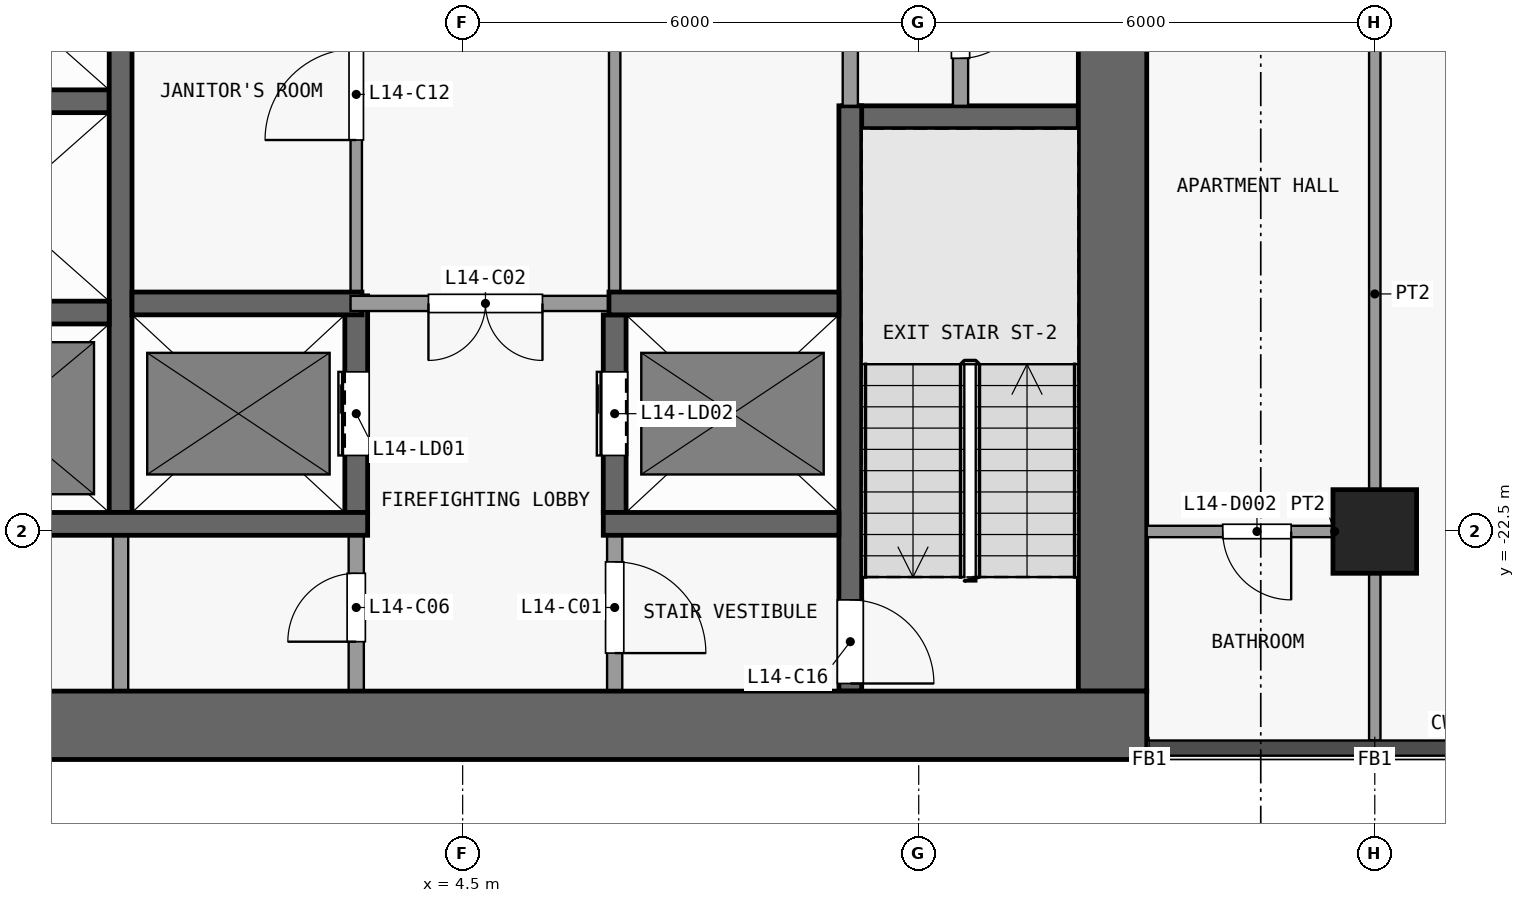
"""IFC4 building model, lengths in metres.
Left out: names, types, materials, properties, quantities, classifications, styles, units other than length and angle.
Written with IfcOpenShell. Run it as: python <this file> out.ifc"""

import sys

from ifc_helpers import new_model, si_unit, direction, frame, frame_2d, origin, origin_2d, place, context, subcontext, project, spatial, rectangle, extrude, element, fill, save


model = new_model("IFC4")
c1 = context("Model", 3, precision=1e-05, world=origin(), true_north=direction((0.0, 1.0)))
c2 = subcontext(c1, "Body", "Model", "MODEL_VIEW")
j1 = project(units=[si_unit("LENGTHUNIT", "METRE"), si_unit("PLANEANGLEUNIT", "RADIAN")], contexts=[c1])
p1 = place(None, origin())
s1 = spatial("IfcSite", under=j1, at=p1, CompositionType="ELEMENT")
p2 = place(p1, origin())
s2 = spatial("IfcBuilding", under=s1, at=p2, CompositionType="ELEMENT")
p3 = place(p2, frame((0.0, 0.0, 61.3)))
s3 = spatial("IfcBuildingStorey", under=s2, at=p3, CompositionType="ELEMENT", Elevation=61.3)
p4 = place(p3, frame((16.5, -22.5, 0.0), z_axis=(0.0, 0.0, 1.0), x_axis=(1.0, 0.0, 0.0)))
e1 = element("IfcColumn", 1, at=p4, inside=s3, PredefinedType="COLUMN", context=c2, shape_type="SweptSolid", body=[
    extrude(rectangle(XDim=1.1, YDim=1.1, at=origin_2d()), origin(), (0.0, 0.0, 1.0), 3.6),
])
p5 = place(p3, frame((-13.5, -25.05, 0.0), z_axis=(0.0, 0.0, 1.0), x_axis=(1.0, 0.0, 0.0)))
e2 = element("IfcWall", 2, at=p5, inside=s3, PredefinedType="SHEAR", context=c2, shape_type="SweptSolid", body=[
    extrude(rectangle(XDim=27.0, YDim=0.9, at=frame_2d((13.5, 0.0))), origin(), (0.0, 0.0, 1.0), 3.3),
])
p6 = place(p3, frame((13.05, -24.6, 0.0), z_axis=(0.0, 0.0, 1.0), x_axis=(0.0, 1.0, 0.0)))
e3 = element("IfcWall", 3, at=p6, inside=s3, PredefinedType="SHEAR", context=c2, shape_type="SweptSolid", body=[
    extrude(rectangle(XDim=16.1, YDim=0.9, at=frame_2d((8.05, 0.0))), origin(), (0.0, 0.0, 1.0), 3.3),
])
p7 = place(p3, frame((-2.95, -22.4, 0.0), z_axis=(0.0, 0.0, 1.0), x_axis=(1.0, 0.0, 0.0)))
e4 = element("IfcWall", 4, at=p7, inside=s3, PredefinedType="SHEAR", context=c2, shape_type="SweptSolid", body=[
    extrude(rectangle(XDim=6.2, YDim=0.3, at=frame_2d((3.1, 0.0))), origin(), (0.0, 0.0, 1.0), 3.3),
])
p8 = place(p3, frame((6.35, -22.4, 0.0), z_axis=(0.0, 0.0, 1.0), x_axis=(1.0, 0.0, 0.0)))
e5 = element("IfcWall", 5, at=p8, inside=s3, PredefinedType="SHEAR", context=c2, shape_type="SweptSolid", body=[
    extrude(rectangle(XDim=3.1, YDim=0.3, at=frame_2d((1.55, 0.0))), origin(), (0.0, 0.0, 1.0), 3.3),
])
p9 = place(p3, frame((-2.95, -19.62, 0.0), z_axis=(0.0, 0.0, 1.0), x_axis=(1.0, 0.0, 0.0)))
e6 = element("IfcWall", 6, at=p9, inside=s3, PredefinedType="SHEAR", context=c2, shape_type="SweptSolid", body=[
    extrude(rectangle(XDim=2.8, YDim=0.3, at=frame_2d((1.4, 0.0))), origin(), (0.0, 0.0, 1.0), 3.3),
])
p10 = place(p3, frame((0.15, -19.5, 0.0), z_axis=(0.0, 0.0, 1.0), x_axis=(1.0, 0.0, 0.0)))
e7 = element("IfcWall", 7, at=p10, inside=s3, PredefinedType="SHEAR", context=c2, shape_type="SweptSolid", body=[
    extrude(rectangle(XDim=3.025, YDim=0.3, at=frame_2d((1.513, 0.0))), origin(), (0.0, 0.0, 1.0), 3.3),
])
p11 = place(p3, frame((6.575, -19.5, 0.0), z_axis=(0.0, 0.0, 1.0), x_axis=(-1.0, 0.0, 0.0)))
e8 = element("IfcWall", 8, at=p11, inside=s3, PredefinedType="PARTITIONING", context=c2, shape_type="SweptSolid", body=[
    extrude(rectangle(XDim=3.55, YDim=0.2, at=frame_2d((1.775, 0.0))), origin(), (0.0, 0.0, 1.0), 3.3),
])
p12 = place(p11, frame((1.025, 0.0, 0.0)))
e9 = element("IfcOpeningElement", 9, at=p12, cuts=e8, PredefinedType="OPENING", context=c2, shape_type="SweptSolid", body=[
    extrude(rectangle(XDim=1.5, YDim=2.1, at=frame_2d((0.75, 1.05))), frame((0.0, 0.11, 0.0), z_axis=(0.0, -1.0, 0.0), x_axis=(1.0, 0.0, 0.0)), (0.0, 0.0, 1.0), 0.22),
])
p13 = place(p3, frame((6.425, -19.5, 0.0), z_axis=(0.0, 0.0, 1.0), x_axis=(1.0, 0.0, 0.0)))
e10 = element("IfcWall", 10, at=p13, inside=s3, PredefinedType="SHEAR", context=c2, shape_type="SweptSolid", body=[
    extrude(rectangle(XDim=3.025, YDim=0.3, at=frame_2d((1.512, 0.0))), origin(), (0.0, 0.0, 1.0), 3.3),
])
p14 = place(p3, frame((9.5, -17.05, 0.0), z_axis=(0.0, 0.0, 1.0), x_axis=(1.0, 0.0, 0.0)))
e11 = element("IfcWall", 11, at=p14, inside=s3, PredefinedType="SHEAR", context=c2, shape_type="SweptSolid", body=[
    extrude(rectangle(XDim=3.1, YDim=0.3, at=frame_2d((1.55, 0.0))), origin(), (0.0, 0.0, 1.0), 3.3),
])
p15 = place(p3, frame((-2.95, -16.84, 0.0), z_axis=(0.0, 0.0, 1.0), x_axis=(1.0, 0.0, 0.0)))
e12 = element("IfcWall", 12, at=p15, inside=s3, PredefinedType="SHEAR", context=c2, shape_type="SweptSolid", body=[
    extrude(rectangle(XDim=2.8, YDim=0.3, at=frame_2d((1.4, 0.0))), origin(), (0.0, 0.0, 1.0), 3.3),
])
p16 = place(p3, frame((0.0, -24.6, 0.0), z_axis=(0.0, 0.0, 1.0), x_axis=(0.0, 1.0, 0.0)))
e13 = element("IfcWall", 13, at=p16, inside=s3, PredefinedType="PARTITIONING", context=c2, shape_type="SweptSolid", body=[
    extrude(rectangle(XDim=2.05, YDim=0.2, at=frame_2d((1.025, 0.0))), origin(), (0.0, 0.0, 1.0), 3.3),
])
p17 = place(p3, frame((0.0, -22.25, 0.0), z_axis=(0.0, 0.0, 1.0), x_axis=(0.0, 1.0, 0.0)))
e14 = element("IfcWall", 14, at=p17, inside=s3, PredefinedType="SHEAR", context=c2, shape_type="SweptSolid", body=[
    extrude(rectangle(XDim=13.75, YDim=0.3, at=frame_2d((6.875, 0.0))), origin(), (0.0, 0.0, 1.0), 3.3),
])
p18 = place(p3, frame((3.1, -24.6, 0.0), z_axis=(0.0, 0.0, 1.0), x_axis=(0.0, 1.0, 0.0)))
e15 = element("IfcWall", 15, at=p18, inside=s3, PredefinedType="PARTITIONING", context=c2, shape_type="SweptSolid", body=[
    extrude(rectangle(XDim=2.05, YDim=0.2, at=frame_2d((1.025, 0.0))), origin(), (0.0, 0.0, 1.0), 3.3),
])
p19 = place(p18, frame((0.65, 0.0, 0.0)))
e16 = element("IfcOpeningElement", 16, at=p19, cuts=e15, PredefinedType="OPENING", context=c2, shape_type="SweptSolid", body=[
    extrude(rectangle(XDim=0.9, YDim=2.1, at=frame_2d((0.45, 1.05))), frame((0.0, 0.11, 0.0), z_axis=(0.0, -1.0, 0.0), x_axis=(1.0, 0.0, 0.0)), (0.0, 0.0, 1.0), 0.22),
])
p20 = place(p3, frame((3.1, -22.25, 0.0), z_axis=(0.0, 0.0, 1.0), x_axis=(0.0, 1.0, 0.0)))
e17 = element("IfcWall", 17, at=p20, inside=s3, PredefinedType="SHEAR", context=c2, shape_type="SweptSolid", body=[
    extrude(rectangle(XDim=2.85, YDim=0.3, at=frame_2d((1.425, 0.0))), origin(), (0.0, 0.0, 1.0), 3.3),
])
p21 = place(p20, frame((0.75, 0.0, 0.0)))
e18 = element("IfcOpeningElement", 18, at=p21, cuts=e17, PredefinedType="OPENING", context=c2, shape_type="SweptSolid", body=[
    extrude(rectangle(XDim=1.1, YDim=2.1, at=frame_2d((0.55, 1.05))), frame((0.0, 0.16, 0.0), z_axis=(0.0, -1.0, 0.0), x_axis=(1.0, 0.0, 0.0)), (0.0, 0.0, 1.0), 0.32),
])
p22 = place(p3, frame((3.1, -19.4, 0.0), z_axis=(0.0, 0.0, 1.0), x_axis=(0.0, 1.0, 0.0)))
e19 = element("IfcWall", 19, at=p22, inside=s3, PredefinedType="PARTITIONING", context=c2, shape_type="SweptSolid", body=[
    extrude(rectangle(XDim=10.9, YDim=0.15, at=frame_2d((5.45, 0.0))), origin(), (0.0, 0.0, 1.0), 3.3),
])
p23 = place(p22, frame((2.05, 0.0, 0.0)))
e20 = element("IfcOpeningElement", 20, at=p23, cuts=e19, PredefinedType="OPENING", context=c2, shape_type="SweptSolid", body=[
    extrude(rectangle(XDim=1.2, YDim=2.1, at=frame_2d((0.6, 1.05))), frame((0.0, 0.085, 0.0), z_axis=(0.0, -1.0, 0.0), x_axis=(1.0, 0.0, 0.0)), (0.0, 0.0, 1.0), 0.17),
])
p24 = place(p22, frame((7.55, 0.0, 0.0)))
e21 = element("IfcOpeningElement", 21, at=p24, cuts=e19, PredefinedType="OPENING", context=c2, shape_type="SweptSolid", body=[
    extrude(rectangle(XDim=1.2, YDim=2.1, at=frame_2d((0.6, 1.05))), frame((0.0, 0.085, 0.0), z_axis=(0.0, -1.0, 0.0), x_axis=(1.0, 0.0, 0.0)), (0.0, 0.0, 1.0), 0.17),
])
p25 = place(p3, frame((6.5, -22.55, 0.0), z_axis=(0.0, 0.0, 1.0), x_axis=(0.0, -1.0, 0.0)))
e22 = element("IfcWall", 22, at=p25, inside=s3, PredefinedType="PARTITIONING", context=c2, shape_type="SweptSolid", body=[
    extrude(rectangle(XDim=2.05, YDim=0.2, at=frame_2d((1.025, 0.0))), origin(), (0.0, 0.0, 1.0), 3.3),
])
p26 = place(p25, frame((0.35, 0.0, 0.0)))
e23 = element("IfcOpeningElement", 23, at=p26, cuts=e22, PredefinedType="OPENING", context=c2, shape_type="SweptSolid", body=[
    extrude(rectangle(XDim=1.2, YDim=2.1, at=frame_2d((0.6, 1.05))), frame((0.0, 0.11, 0.0), z_axis=(0.0, -1.0, 0.0), x_axis=(1.0, 0.0, 0.0)), (0.0, 0.0, 1.0), 0.22),
])
p27 = place(p3, frame((6.5, -22.25, 0.0), z_axis=(0.0, 0.0, 1.0), x_axis=(0.0, 1.0, 0.0)))
e24 = element("IfcWall", 24, at=p27, inside=s3, PredefinedType="SHEAR", context=c2, shape_type="SweptSolid", body=[
    extrude(rectangle(XDim=2.6, YDim=0.3, at=frame_2d((1.3, 0.0))), origin(), (0.0, 0.0, 1.0), 3.3),
])
p28 = place(p27, frame((0.75, 0.0, 0.0)))
e25 = element("IfcOpeningElement", 25, at=p28, cuts=e24, PredefinedType="OPENING", context=c2, shape_type="SweptSolid", body=[
    extrude(rectangle(XDim=1.1, YDim=2.1, at=frame_2d((0.55, 1.05))), frame((0.0, 0.16, 0.0), z_axis=(0.0, -1.0, 0.0), x_axis=(1.0, 0.0, 0.0)), (0.0, 0.0, 1.0), 0.32),
])
p29 = place(p3, frame((6.5, -11.35, 0.0), z_axis=(0.0, 0.0, 1.0), x_axis=(0.0, -1.0, 0.0)))
e26 = element("IfcWall", 26, at=p29, inside=s3, PredefinedType="PARTITIONING", context=c2, shape_type="SweptSolid", body=[
    extrude(rectangle(XDim=8.0, YDim=0.15, at=frame_2d((4.0, 0.0))), origin(), (0.0, 0.0, 1.0), 3.3),
])
p30 = place(p29, frame((3.425, 0.0, 0.0)))
e27 = element("IfcOpeningElement", 27, at=p30, cuts=e26, PredefinedType="OPENING", context=c2, shape_type="SweptSolid", body=[
    extrude(rectangle(XDim=1.2, YDim=2.1, at=frame_2d((0.6, 1.05))), frame((0.0, 0.085, 0.0), z_axis=(0.0, -1.0, 0.0), x_axis=(1.0, 0.0, 0.0)), (0.0, 0.0, 1.0), 0.17),
])
p31 = place(p3, frame((9.6, -16.9, 0.0), z_axis=(0.0, 0.0, 1.0), x_axis=(0.0, -1.0, 0.0)))
e28 = element("IfcWall", 28, at=p31, inside=s3, PredefinedType="SHEAR", context=c2, shape_type="SweptSolid", body=[
    extrude(rectangle(XDim=7.7, YDim=0.3, at=frame_2d((3.85, 0.0))), origin(), (0.0, 0.0, 1.0), 3.3),
])
p32 = place(p31, frame((6.5, 0.0, 0.0)))
e29 = element("IfcOpeningElement", 29, at=p32, cuts=e28, PredefinedType="OPENING", context=c2, shape_type="SweptSolid", body=[
    extrude(rectangle(XDim=1.1, YDim=2.1, at=frame_2d((0.55, 1.05))), frame((0.0, 0.16, 0.0), z_axis=(0.0, -1.0, 0.0), x_axis=(1.0, 0.0, 0.0)), (0.0, 0.0, 1.0), 0.32),
])
p33 = place(p3, frame((9.6, -16.9, 0.0), z_axis=(0.0, 0.0, 1.0), x_axis=(0.0, 1.0, 0.0)))
e30 = element("IfcWall", 30, at=p33, inside=s3, PredefinedType="PARTITIONING", context=c2, shape_type="SweptSolid", body=[
    extrude(rectangle(XDim=5.75, YDim=0.2, at=frame_2d((2.875, 0.0))), origin(), (0.0, 0.0, 1.0), 3.3),
])
p34 = place(p3, frame((11.05, -14.5, 0.0), z_axis=(0.0, 0.0, 1.0), x_axis=(0.0, -1.0, 0.0)))
e31 = element("IfcWall", 31, at=p34, inside=s3, PredefinedType="PARTITIONING", context=c2, shape_type="SweptSolid", body=[
    extrude(rectangle(XDim=2.4, YDim=0.2, at=frame_2d((1.2, 0.0))), origin(), (0.0, 0.0, 1.0), 3.3),
])
p35 = place(p34, frame((0.875, 0.0, 0.0)))
e32 = element("IfcOpeningElement", 32, at=p35, cuts=e31, PredefinedType="OPENING", context=c2, shape_type="SweptSolid", body=[
    extrude(rectangle(XDim=0.9, YDim=2.1, at=frame_2d((0.45, 1.05))), frame((0.0, 0.11, 0.0), z_axis=(0.0, -1.0, 0.0), x_axis=(1.0, 0.0, 0.0)), (0.0, 0.0, 1.0), 0.22),
])
p36 = place(p3, frame((13.5, -22.5, 0.0), z_axis=(0.0, 0.0, 1.0), x_axis=(1.0, 0.0, 0.0)))
e33 = element("IfcWall", 33, at=p36, inside=s3, PredefinedType="PARTITIONING", context=c2, shape_type="SweptSolid", body=[
    extrude(rectangle(XDim=2.925, YDim=0.15, at=frame_2d((1.462, 0.0))), origin(), (0.0, 0.0, 1.0), 3.3),
])
p37 = place(p36, frame((1.0, 0.0, 0.0)))
e34 = element("IfcOpeningElement", 34, at=p37, cuts=e33, PredefinedType="OPENING", context=c2, shape_type="SweptSolid", body=[
    extrude(rectangle(XDim=0.9, YDim=2.1, at=frame_2d((0.45, 1.05))), frame((0.0, 0.085, 0.0), z_axis=(0.0, -1.0, 0.0), x_axis=(1.0, 0.0, 0.0)), (0.0, 0.0, 1.0), 0.17),
])
p38 = place(p3, frame((16.5, -25.25, 0.0), z_axis=(0.0, 0.0, 1.0), x_axis=(0.0, 1.0, 0.0)))
e35 = element("IfcWall", 35, at=p38, inside=s3, PredefinedType="PARTITIONING", context=c2, shape_type="SweptSolid", body=[
    extrude(rectangle(XDim=11.75, YDim=0.15, at=frame_2d((5.875, 0.0))), origin(), (0.0, 0.0, 1.0), 3.3),
])
p39 = place(p21, origin())
e36 = element("IfcDoor", 36, at=p39, inside=s3, OperationType="DOUBLE_DOOR_SLIDING", PredefinedType="DOOR", context=c2, shape_type="SweptSolid", body=[
    extrude(rectangle(XDim=1.1, YDim=2.1, at=frame_2d((0.55, 1.05))), frame((0.0, 0.025, 0.0), z_axis=(0.0, -1.0, 0.0), x_axis=(1.0, 0.0, 0.0)), (0.0, 0.0, 1.0), 0.05),
])
fill(e18, e36)
p40 = place(p28, origin())
e37 = element("IfcDoor", 37, at=p40, inside=s3, OperationType="DOUBLE_DOOR_SLIDING", PredefinedType="DOOR", context=c2, shape_type="SweptSolid", body=[
    extrude(rectangle(XDim=1.1, YDim=2.1, at=frame_2d((0.55, 1.05))), frame((0.0, 0.025, 0.0), z_axis=(0.0, -1.0, 0.0), x_axis=(1.0, 0.0, 0.0)), (0.0, 0.0, 1.0), 0.05),
])
fill(e25, e37)
p41 = place(p26, origin())
e38 = element("IfcDoor", 38, at=p41, inside=s3, OperationType="SINGLE_SWING_RIGHT", PredefinedType="DOOR", context=c2, shape_type="SweptSolid", body=[
    extrude(rectangle(XDim=1.2, YDim=2.1, at=frame_2d((0.6, 1.05))), frame((0.0, 0.025, 0.0), z_axis=(0.0, -1.0, 0.0), x_axis=(1.0, 0.0, 0.0)), (0.0, 0.0, 1.0), 0.05),
])
fill(e23, e38)
p42 = place(p12, origin())
e39 = element("IfcDoor", 39, at=p42, inside=s3, OperationType="DOUBLE_DOOR_SINGLE_SWING", PredefinedType="DOOR", context=c2, shape_type="SweptSolid", body=[
    extrude(rectangle(XDim=1.5, YDim=2.1, at=frame_2d((0.75, 1.05))), frame((0.0, 0.025, 0.0), z_axis=(0.0, -1.0, 0.0), x_axis=(1.0, 0.0, 0.0)), (0.0, 0.0, 1.0), 0.05),
])
fill(e9, e39)
p43 = place(p19, origin())
e40 = element("IfcDoor", 40, at=p43, inside=s3, OperationType="SINGLE_SWING_LEFT", PredefinedType="DOOR", context=c2, shape_type="SweptSolid", body=[
    extrude(rectangle(XDim=0.9, YDim=2.1, at=frame_2d((0.45, 1.05))), frame((0.0, 0.025, 0.0), z_axis=(0.0, -1.0, 0.0), x_axis=(1.0, 0.0, 0.0)), (0.0, 0.0, 1.0), 0.05),
])
fill(e16, e40)
p44 = place(p35, origin())
e41 = element("IfcDoor", 41, at=p44, inside=s3, OperationType="SINGLE_SWING_LEFT", PredefinedType="DOOR", context=c2, shape_type="SweptSolid", body=[
    extrude(rectangle(XDim=0.9, YDim=2.1, at=frame_2d((0.45, 1.05))), frame((0.0, 0.025, 0.0), z_axis=(0.0, -1.0, 0.0), x_axis=(1.0, 0.0, 0.0)), (0.0, 0.0, 1.0), 0.05),
])
fill(e32, e41)
p45 = place(p23, origin())
e42 = element("IfcDoor", 42, at=p45, inside=s3, OperationType="SINGLE_SWING_LEFT", PredefinedType="DOOR", context=c2, shape_type="SweptSolid", body=[
    extrude(rectangle(XDim=1.2, YDim=2.1, at=frame_2d((0.6, 1.05))), frame((0.0, 0.025, 0.0), z_axis=(0.0, -1.0, 0.0), x_axis=(1.0, 0.0, 0.0)), (0.0, 0.0, 1.0), 0.05),
])
fill(e20, e42)
p46 = place(p32, origin())
e43 = element("IfcDoor", 43, at=p46, inside=s3, OperationType="SINGLE_SWING_RIGHT", PredefinedType="DOOR", context=c2, shape_type="SweptSolid", body=[
    extrude(rectangle(XDim=1.1, YDim=2.1, at=frame_2d((0.55, 1.05))), frame((0.0, 0.025, 0.0), z_axis=(0.0, -1.0, 0.0), x_axis=(1.0, 0.0, 0.0)), (0.0, 0.0, 1.0), 0.05),
])
fill(e29, e43)
p47 = place(p37, origin())
e44 = element("IfcDoor", 44, at=p47, inside=s3, OperationType="SINGLE_SWING_RIGHT", PredefinedType="DOOR", context=c2, shape_type="SweptSolid", body=[
    extrude(rectangle(XDim=0.9, YDim=2.1, at=frame_2d((0.45, 1.05))), frame((0.0, 0.025, 0.0), z_axis=(0.0, -1.0, 0.0), x_axis=(1.0, 0.0, 0.0)), (0.0, 0.0, 1.0), 0.05),
])
fill(e34, e44)
save(model, sys.argv[1])
